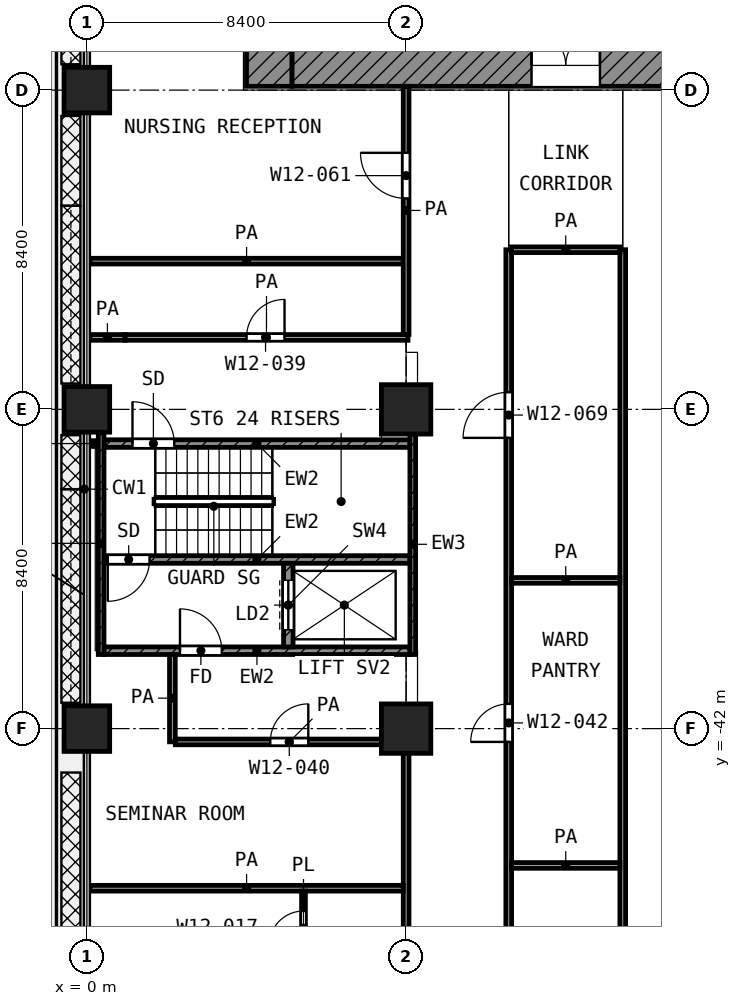
"""IFC4 building model, lengths in metres.
Left out: names, types, materials, properties, quantities, classifications, styles, units other than length and angle.
Written with IfcOpenShell. Run it as: python <this file> out.ifc"""

import sys

from ifc_helpers import new_model, si_unit, direction, frame, frame_2d, origin, origin_2d, place, context, subcontext, project, spatial, rectangle, extrude, element, fill, save


model = new_model("IFC4")
c1 = context("Model", 3, precision=1e-05, world=origin(), true_north=direction((0.0, 1.0)))
c2 = subcontext(c1, "Body", "Model", "MODEL_VIEW")
j1 = project(units=[si_unit("LENGTHUNIT", "METRE"), si_unit("PLANEANGLEUNIT", "RADIAN")], contexts=[c1])
p1 = place(None, origin())
s1 = spatial("IfcSite", under=j1, at=p1, CompositionType="ELEMENT")
p2 = place(p1, origin())
s2 = spatial("IfcBuilding", under=s1, at=p2, CompositionType="ELEMENT")
p3 = place(p2, frame((0.0, 0.0, 77.0)))
s3 = spatial("IfcBuildingStorey", under=s2, at=p3, CompositionType="ELEMENT", Elevation=77.0)
for number, where, z_axis, x_axis in (
    (1, (0.0, -25.2, 0.0), (0.0, 0.0, 1.0), (1.0, 0.0, 0.0)),
    (2, (0.0, -33.6, 0.0), (0.0, 0.0, 1.0), (1.0, 0.0, 0.0)),
):
    element("IfcColumn", number, at=place(p3, frame(where, z_axis=z_axis, x_axis=x_axis)), inside=s3, PredefinedType="COLUMN", context=c2, shape_type="SweptSolid", body=[
        extrude(rectangle(XDim=1.2, YDim=1.2, at=origin_2d()), origin(), (0.0, 0.0, 1.0), 4.2),
    ])
p4 = place(p3, frame((8.4, -33.6, 0.0), z_axis=(0.0, 0.0, 1.0), x_axis=(1.0, 0.0, 0.0)))
e3 = element("IfcColumn", 3, at=p4, inside=s3, PredefinedType="COLUMN", context=c2, shape_type="SweptSolid", body=[
    extrude(rectangle(XDim=1.3, YDim=1.3, at=origin_2d()), origin(), (0.0, 0.0, 1.0), 4.2),
])
p5 = place(p3, frame((0.0, -42.0, 0.0), z_axis=(0.0, 0.0, 1.0), x_axis=(1.0, 0.0, 0.0)))
e4 = element("IfcColumn", 4, at=p5, inside=s3, PredefinedType="COLUMN", context=c2, shape_type="SweptSolid", body=[
    extrude(rectangle(XDim=1.2, YDim=1.2, at=origin_2d()), origin(), (0.0, 0.0, 1.0), 4.2),
])
p6 = place(p3, frame((8.4, -42.0, 0.0), z_axis=(0.0, 0.0, 1.0), x_axis=(1.0, 0.0, 0.0)))
e5 = element("IfcColumn", 5, at=p6, inside=s3, PredefinedType="COLUMN", context=c2, shape_type="SweptSolid", body=[
    extrude(rectangle(XDim=1.3, YDim=1.3, at=origin_2d()), origin(), (0.0, 0.0, 1.0), 4.2),
])
p7 = place(p3, frame((4.8, -25.1, 0.0), z_axis=(0.0, 0.0, 1.0), x_axis=(0.0, 1.0, 0.0)))
e6 = element("IfcWall", 6, at=p7, inside=s3, PredefinedType="SHEAR", context=c2, shape_type="SweptSolid", body=[
    extrude(rectangle(XDim=19.7, YDim=1.2, at=frame_2d((9.85, 0.0))), origin(), (0.0, 0.0, 1.0), 3.9),
])
p8 = place(p7, frame((11.55, 0.0, 0.0)))
e7 = element("IfcOpeningElement", 7, at=p8, cuts=e6, PredefinedType="OPENING", context=c2, shape_type="SweptSolid", body=[
    extrude(rectangle(XDim=1.1, YDim=2.1, at=frame_2d((0.55, 1.05))), frame((0.0, 0.61, 0.0), z_axis=(0.0, -1.0, 0.0), x_axis=(1.0, 0.0, 0.0)), (0.0, 0.0, 1.0), 1.22),
])
p9 = place(p7, frame((2.25, 0.0, 0.0)))
e8 = element("IfcOpeningElement", 8, at=p9, cuts=e6, PredefinedType="OPENING", context=c2, shape_type="SweptSolid", body=[
    extrude(rectangle(XDim=1.1, YDim=2.1, at=frame_2d((0.55, 1.05))), frame((0.0, 0.61, 0.0), z_axis=(0.0, -1.0, 0.0), x_axis=(1.0, 0.0, 0.0)), (0.0, 0.0, 1.0), 1.22),
])
p10 = place(p3, frame((5.4, -24.55, 0.0), z_axis=(0.0, 0.0, 1.0), x_axis=(1.0, 0.0, 0.0)))
e9 = element("IfcWall", 9, at=p10, inside=s3, PredefinedType="SHEAR", context=c2, shape_type="SweptSolid", body=[
    extrude(rectangle(XDim=18.6, YDim=1.1, at=frame_2d((9.3, 0.0))), origin(), (0.0, 0.0, 1.0), 3.9),
])
p11 = place(p10, frame((6.3, 0.0, 0.0)))
e10 = element("IfcOpeningElement", 10, at=p11, cuts=e9, PredefinedType="OPENING", context=c2, shape_type="SweptSolid", body=[
    extrude(rectangle(XDim=1.8, YDim=2.1, at=frame_2d((0.9, 1.05))), frame((0.0, 0.56, 0.0), z_axis=(0.0, -1.0, 0.0), x_axis=(1.0, 0.0, 0.0)), (0.0, 0.0, 1.0), 1.12),
])
p12 = place(p3, frame((0.375, -40.05, 0.0), z_axis=(0.0, 0.0, 1.0), x_axis=(0.0, 1.0, 0.0)))
e11 = element("IfcWall", 11, at=p12, inside=s3, PredefinedType="SHEAR", context=c2, shape_type="SweptSolid", body=[
    extrude(rectangle(XDim=5.85, YDim=0.15, at=frame_2d((2.925, 0.0))), origin(), (0.0, 0.0, 1.0), 3.9),
])
p13 = place(p3, frame((8.575, -40.05, 0.0), z_axis=(0.0, 0.0, 1.0), x_axis=(0.0, 1.0, 0.0)))
e12 = element("IfcWall", 12, at=p13, inside=s3, PredefinedType="SHEAR", context=c2, shape_type="SweptSolid", body=[
    extrude(rectangle(XDim=5.8, YDim=0.15, at=frame_2d((2.9, 0.0))), origin(), (0.0, 0.0, 1.0), 3.9),
])
p14 = place(p3, frame((0.45, -34.5, 0.0), z_axis=(0.0, 0.0, 1.0), x_axis=(1.0, 0.0, 0.0)))
e13 = element("IfcWall", 13, at=p14, inside=s3, PredefinedType="SHEAR", context=c2, shape_type="SweptSolid", body=[
    extrude(rectangle(XDim=8.05, YDim=0.2, at=frame_2d((4.025, 0.0))), origin(), (0.0, 0.0, 1.0), 3.9),
])
p15 = place(p14, frame((0.75, 0.0, 0.0)))
e14 = element("IfcOpeningElement", 14, at=p15, cuts=e13, PredefinedType="OPENING", context=c2, shape_type="SweptSolid", body=[
    extrude(rectangle(XDim=1.1, YDim=2.1, at=frame_2d((0.55, 1.05))), frame((0.0, 0.11, 0.0), z_axis=(0.0, -1.0, 0.0), x_axis=(1.0, 0.0, 0.0)), (0.0, 0.0, 1.0), 0.22),
])
p16 = place(p3, frame((0.45, -37.55, 0.0), z_axis=(0.0, 0.0, 1.0), x_axis=(1.0, 0.0, 0.0)))
e15 = element("IfcWall", 15, at=p16, inside=s3, PredefinedType="SHEAR", context=c2, shape_type="SweptSolid", body=[
    extrude(rectangle(XDim=8.05, YDim=0.2, at=frame_2d((4.025, 0.0))), origin(), (0.0, 0.0, 1.0), 3.9),
])
p17 = place(p16, frame((0.1, 0.0, 0.0)))
e16 = element("IfcOpeningElement", 16, at=p17, cuts=e15, PredefinedType="OPENING", context=c2, shape_type="SweptSolid", body=[
    extrude(rectangle(XDim=1.1, YDim=2.1, at=frame_2d((0.55, 1.05))), frame((0.0, 0.11, 0.0), z_axis=(0.0, -1.0, 0.0), x_axis=(1.0, 0.0, 0.0)), (0.0, 0.0, 1.0), 0.22),
])
p18 = place(p3, frame((0.45, -39.95, 0.0), z_axis=(0.0, 0.0, 1.0), x_axis=(1.0, 0.0, 0.0)))
e17 = element("IfcWall", 17, at=p18, inside=s3, PredefinedType="SHEAR", context=c2, shape_type="SweptSolid", body=[
    extrude(rectangle(XDim=8.05, YDim=0.2, at=frame_2d((4.025, 0.0))), origin(), (0.0, 0.0, 1.0), 3.9),
])
p19 = place(p18, frame((2.0, 0.0, 0.0)))
e18 = element("IfcOpeningElement", 18, at=p19, cuts=e17, PredefinedType="OPENING", context=c2, shape_type="SweptSolid", body=[
    extrude(rectangle(XDim=1.1, YDim=2.1, at=frame_2d((0.55, 1.05))), frame((0.0, 0.11, 0.0), z_axis=(0.0, -1.0, 0.0), x_axis=(1.0, 0.0, 0.0)), (0.0, 0.0, 1.0), 0.22),
])
p20 = place(p3, frame((5.3, -39.85, 0.0), z_axis=(0.0, 0.0, 1.0), x_axis=(0.0, 1.0, 0.0)))
e19 = element("IfcWall", 19, at=p20, inside=s3, PredefinedType="SHEAR", context=c2, shape_type="SweptSolid", body=[
    extrude(rectangle(XDim=2.2, YDim=0.25, at=frame_2d((1.1, 0.0))), origin(), (0.0, 0.0, 1.0), 3.9),
])
p21 = place(p20, frame((0.45, 0.0, 0.0)))
e20 = element("IfcOpeningElement", 20, at=p21, cuts=e19, PredefinedType="OPENING", context=c2, shape_type="SweptSolid", body=[
    extrude(rectangle(XDim=1.3, YDim=2.1, at=frame_2d((0.65, 1.05))), frame((0.0, 0.135, 0.0), z_axis=(0.0, -1.0, 0.0), x_axis=(1.0, 0.0, 0.0)), (0.0, 0.0, 1.0), 0.27),
])
p22 = place(p3, frame((5.7, -48.3, 0.0), z_axis=(0.0, 0.0, 1.0), x_axis=(0.0, 1.0, 0.0)))
e21 = element("IfcWall", 21, at=p22, inside=s3, PredefinedType="PARTITIONING", context=c2, shape_type="SweptSolid", body=[
    extrude(rectangle(XDim=2.025, YDim=0.1, at=frame_2d((1.013, 0.0))), origin(), (0.0, 0.0, 1.0), 3.9),
])
p23 = place(p22, frame((0.6, 0.0, 0.0)))
e22 = element("IfcOpeningElement", 22, at=p23, cuts=e21, PredefinedType="OPENING", context=c2, shape_type="SweptSolid", body=[
    extrude(rectangle(XDim=0.9, YDim=2.1, at=frame_2d((0.45, 1.05))), frame((0.0, 0.06, 0.0), z_axis=(0.0, -1.0, 0.0), x_axis=(1.0, 0.0, 0.0)), (0.0, 0.0, 1.0), 0.12),
])
p24 = place(p3, frame((0.08, -46.2, 0.0), z_axis=(0.0, 0.0, 1.0), x_axis=(1.0, 0.0, 0.0)))
e23 = element("IfcWall", 23, at=p24, inside=s3, PredefinedType="PARTITIONING", context=c2, shape_type="SweptSolid", body=[
    extrude(rectangle(XDim=8.245, YDim=0.15, at=frame_2d((4.123, 0.0))), origin(), (0.0, 0.0, 1.0), 3.9),
])
p25 = place(p3, frame((11.175, -45.6, 0.0), z_axis=(0.0, 0.0, 1.0), x_axis=(1.0, 0.0, 0.0)))
e24 = element("IfcWall", 24, at=p25, inside=s3, PredefinedType="PARTITIONING", context=c2, shape_type="SweptSolid", body=[
    extrude(rectangle(XDim=2.85, YDim=0.15, at=frame_2d((1.425, 0.0))), origin(), (0.0, 0.0, 1.0), 3.9),
])
p26 = place(p3, frame((2.327, -42.35, 0.0), z_axis=(0.0, 0.0, 1.0), x_axis=(1.0, 0.0, 0.0)))
e25 = element("IfcWall", 25, at=p26, inside=s3, PredefinedType="PARTITIONING", context=c2, shape_type="SweptSolid", body=[
    extrude(rectangle(XDim=5.998, YDim=0.15, at=frame_2d((2.999, 0.0))), origin(), (0.0, 0.0, 1.0), 3.9),
])
p27 = place(p26, frame((2.499, 0.0, 0.0)))
e26 = element("IfcOpeningElement", 26, at=p27, cuts=e25, PredefinedType="OPENING", context=c2, shape_type="SweptSolid", body=[
    extrude(rectangle(XDim=1.0, YDim=2.1, at=frame_2d((0.5, 1.05))), frame((0.0, 0.085, 0.0), z_axis=(0.0, -1.0, 0.0), x_axis=(1.0, 0.0, 0.0)), (0.0, 0.0, 1.0), 0.17),
])
p28 = place(p3, frame((11.175, -38.1, 0.0), z_axis=(0.0, 0.0, 1.0), x_axis=(1.0, 0.0, 0.0)))
e27 = element("IfcWall", 27, at=p28, inside=s3, PredefinedType="PARTITIONING", context=c2, shape_type="SweptSolid", body=[
    extrude(rectangle(XDim=2.85, YDim=0.15, at=frame_2d((1.425, 0.0))), origin(), (0.0, 0.0, 1.0), 3.9),
])
p29 = place(p3, frame((0.08, -34.5, 0.0), z_axis=(0.0, 0.0, 1.0), x_axis=(1.0, 0.0, 0.0)))
e28 = element("IfcWall", 28, at=p29, inside=s3, PredefinedType="PARTITIONING", context=c2, shape_type="SweptSolid", body=[
    extrude(rectangle(XDim=0.19, YDim=0.15, at=frame_2d((0.095, 0.0))), origin(), (0.0, 0.0, 1.0), 3.9),
])
p30 = place(p3, frame((0.08, -31.707, 0.0), z_axis=(0.0, 0.0, 1.0), x_axis=(1.0, 0.0, 0.0)))
e29 = element("IfcWall", 29, at=p30, inside=s3, PredefinedType="PARTITIONING", context=c2, shape_type="SweptSolid", body=[
    extrude(rectangle(XDim=0.92, YDim=0.15, at=frame_2d((0.46, 0.0))), origin(), (0.0, 0.0, 1.0), 3.9),
])
p31 = place(p3, frame((1.002, -31.707, 0.0), z_axis=(0.0, 0.0, 1.0), x_axis=(1.0, 0.0, 0.0)))
e30 = element("IfcWall", 30, at=p31, inside=s3, PredefinedType="PARTITIONING", context=c2, shape_type="SweptSolid", body=[
    extrude(rectangle(XDim=7.448, YDim=0.15, at=frame_2d((3.724, 0.0))), origin(), (0.0, 0.0, 1.0), 3.9),
])
p32 = place(p31, frame((3.199, 0.0, 0.0)))
e31 = element("IfcOpeningElement", 31, at=p32, cuts=e30, PredefinedType="OPENING", context=c2, shape_type="SweptSolid", body=[
    extrude(rectangle(XDim=1.0, YDim=2.1, at=frame_2d((0.5, 1.05))), frame((0.0, 0.085, 0.0), z_axis=(0.0, -1.0, 0.0), x_axis=(1.0, 0.0, 0.0)), (0.0, 0.0, 1.0), 0.17),
])
p33 = place(p3, frame((0.08, -29.7, 0.0), z_axis=(0.0, 0.0, 1.0), x_axis=(1.0, 0.0, 0.0)))
e32 = element("IfcWall", 32, at=p33, inside=s3, PredefinedType="PARTITIONING", context=c2, shape_type="SweptSolid", body=[
    extrude(rectangle(XDim=8.245, YDim=0.15, at=frame_2d((4.123, 0.0))), origin(), (0.0, 0.0, 1.0), 3.9),
])
p34 = place(p3, frame((11.175, -29.4, 0.0), z_axis=(0.0, 0.0, 1.0), x_axis=(1.0, 0.0, 0.0)))
e33 = element("IfcWall", 33, at=p34, inside=s3, PredefinedType="PARTITIONING", context=c2, shape_type="SweptSolid", body=[
    extrude(rectangle(XDim=2.85, YDim=0.15, at=frame_2d((1.425, 0.0))), origin(), (0.0, 0.0, 1.0), 3.9),
])
p35 = place(p3, frame((2.25, -42.348, 0.0), z_axis=(0.0, 0.0, 1.0), x_axis=(0.0, 1.0, 0.0)))
e34 = element("IfcWall", 34, at=p35, inside=s3, PredefinedType="PARTITIONING", context=c2, shape_type="SweptSolid", body=[
    extrude(rectangle(XDim=2.298, YDim=0.15, at=frame_2d((1.149, 0.0))), origin(), (0.0, 0.0, 1.0), 3.9),
])
p36 = place(p3, frame((8.4, -58.798, 0.0), z_axis=(0.0, 0.0, 1.0), x_axis=(0.0, 1.0, 0.0)))
e35 = element("IfcWall", 35, at=p36, inside=s3, PredefinedType="PARTITIONING", context=c2, shape_type="SweptSolid", body=[
    extrude(rectangle(XDim=16.448, YDim=0.15, at=frame_2d((8.224, 0.0))), origin(), (0.0, 0.0, 1.0), 3.9),
])
p37 = place(p36, frame((9.098, 0.0, 0.0)))
e36 = element("IfcOpeningElement", 36, at=p37, cuts=e35, PredefinedType="OPENING", context=c2, shape_type="SweptSolid", body=[
    extrude(rectangle(XDim=1.2, YDim=2.1, at=frame_2d((0.6, 1.05))), frame((0.0, 0.085, 0.0), z_axis=(0.0, -1.0, 0.0), x_axis=(1.0, 0.0, 0.0)), (0.0, 0.0, 1.0), 0.17),
])
p38 = place(p36, frame((0.699, 0.0, 0.0)))
e37 = element("IfcOpeningElement", 37, at=p38, cuts=e35, PredefinedType="OPENING", context=c2, shape_type="SweptSolid", body=[
    extrude(rectangle(XDim=1.2, YDim=2.1, at=frame_2d((0.6, 1.05))), frame((0.0, 0.085, 0.0), z_axis=(0.0, -1.0, 0.0), x_axis=(1.0, 0.0, 0.0)), (0.0, 0.0, 1.0), 0.17),
])
p39 = place(p36, frame((6.498, 0.0, 0.0)))
e38 = element("IfcOpeningElement", 38, at=p39, cuts=e35, PredefinedType="OPENING", context=c2, shape_type="SweptSolid", body=[
    extrude(rectangle(XDim=1.2, YDim=2.1, at=frame_2d((0.6, 1.05))), frame((0.0, 0.085, 0.0), z_axis=(0.0, -1.0, 0.0), x_axis=(1.0, 0.0, 0.0)), (0.0, 0.0, 1.0), 0.17),
])
p40 = place(p3, frame((8.4, -31.632, 0.0), z_axis=(0.0, 0.0, 1.0), x_axis=(0.0, 1.0, 0.0)))
e39 = element("IfcWall", 39, at=p40, inside=s3, PredefinedType="PARTITIONING", context=c2, shape_type="SweptSolid", body=[
    extrude(rectangle(XDim=6.532, YDim=0.15, at=frame_2d((3.266, 0.0))), origin(), (0.0, 0.0, 1.0), 3.9),
])
p41 = place(p40, frame((3.582, 0.0, 0.0)))
e40 = element("IfcOpeningElement", 40, at=p41, cuts=e39, PredefinedType="OPENING", context=c2, shape_type="SweptSolid", body=[
    extrude(rectangle(XDim=1.2, YDim=2.1, at=frame_2d((0.6, 1.05))), frame((0.0, 0.085, 0.0), z_axis=(0.0, -1.0, 0.0), x_axis=(1.0, 0.0, 0.0)), (0.0, 0.0, 1.0), 0.17),
])
p42 = place(p3, frame((11.1, -68.7, 0.0), z_axis=(0.0, 0.0, 1.0), x_axis=(0.0, 1.0, 0.0)))
e41 = element("IfcWall", 41, at=p42, inside=s3, PredefinedType="PARTITIONING", context=c2, shape_type="SweptSolid", body=[
    extrude(rectangle(XDim=39.3, YDim=0.15, at=frame_2d((19.65, 0.0))), origin(), (0.0, 0.0, 1.0), 3.9),
])
p43 = place(p42, frame((34.35, 0.0, 0.0)))
e42 = element("IfcOpeningElement", 42, at=p43, cuts=e41, PredefinedType="OPENING", context=c2, shape_type="SweptSolid", body=[
    extrude(rectangle(XDim=1.2, YDim=2.1, at=frame_2d((0.6, 1.05))), frame((0.0, 0.085, 0.0), z_axis=(0.0, -1.0, 0.0), x_axis=(1.0, 0.0, 0.0)), (0.0, 0.0, 1.0), 0.17),
])
p44 = place(p42, frame((26.35, 0.0, 0.0)))
e43 = element("IfcOpeningElement", 43, at=p44, cuts=e41, PredefinedType="OPENING", context=c2, shape_type="SweptSolid", body=[
    extrude(rectangle(XDim=1.0, YDim=2.1, at=frame_2d((0.5, 1.05))), frame((0.0, 0.085, 0.0), z_axis=(0.0, -1.0, 0.0), x_axis=(1.0, 0.0, 0.0)), (0.0, 0.0, 1.0), 0.17),
])
p45 = place(p42, frame((6.55, 0.0, 0.0)))
e44 = element("IfcOpeningElement", 44, at=p45, cuts=e41, PredefinedType="OPENING", context=c2, shape_type="SweptSolid", body=[
    extrude(rectangle(XDim=1.0, YDim=2.1, at=frame_2d((0.5, 1.05))), frame((0.0, 0.085, 0.0), z_axis=(0.0, -1.0, 0.0), x_axis=(1.0, 0.0, 0.0)), (0.0, 0.0, 1.0), 0.17),
])
p46 = place(p3, frame((14.1, -68.7, 0.0), z_axis=(0.0, 0.0, 1.0), x_axis=(0.0, 1.0, 0.0)))
e45 = element("IfcWall", 45, at=p46, inside=s3, PredefinedType="PARTITIONING", context=c2, shape_type="SweptSolid", body=[
    extrude(rectangle(XDim=39.3, YDim=0.15, at=frame_2d((19.65, 0.0))), origin(), (0.0, 0.0, 1.0), 3.9),
])
p47 = place(p46, frame((18.1, 0.0, 0.0)))
e46 = element("IfcOpeningElement", 46, at=p47, cuts=e45, PredefinedType="OPENING", context=c2, shape_type="SweptSolid", body=[
    extrude(rectangle(XDim=1.0, YDim=2.1, at=frame_2d((0.5, 1.05))), frame((0.0, 0.085, 0.0), z_axis=(0.0, -1.0, 0.0), x_axis=(1.0, 0.0, 0.0)), (0.0, 0.0, 1.0), 0.17),
])
p48 = place(p11, origin())
e47 = element("IfcDoor", 47, at=p48, inside=s3, OperationType="DOUBLE_DOOR_SINGLE_SWING", PredefinedType="DOOR", context=c2, shape_type="SweptSolid", body=[
    extrude(rectangle(XDim=1.8, YDim=2.1, at=frame_2d((0.9, 1.05))), frame((0.0, 0.025, 0.0), z_axis=(0.0, -1.0, 0.0), x_axis=(1.0, 0.0, 0.0)), (0.0, 0.0, 1.0), 0.05),
])
fill(e10, e47)
p49 = place(p15, origin())
e48 = element("IfcDoor", 48, at=p49, inside=s3, OperationType="SINGLE_SWING_LEFT", PredefinedType="DOOR", context=c2, shape_type="SweptSolid", body=[
    extrude(rectangle(XDim=1.1, YDim=2.1, at=frame_2d((0.55, 1.05))), frame((0.0, 0.025, 0.0), z_axis=(0.0, -1.0, 0.0), x_axis=(1.0, 0.0, 0.0)), (0.0, 0.0, 1.0), 0.05),
])
fill(e14, e48)
p50 = place(p17, frame((1.1, 0.0, 0.0), z_axis=(0.0, 0.0, 1.0), x_axis=(-1.0, 0.0, 0.0)))
e49 = element("IfcDoor", 49, at=p50, inside=s3, OperationType="SINGLE_SWING_LEFT", PredefinedType="DOOR", context=c2, shape_type="SweptSolid", body=[
    extrude(rectangle(XDim=1.1, YDim=2.1, at=frame_2d((0.55, 1.05))), frame((0.0, 0.025, 0.0), z_axis=(0.0, -1.0, 0.0), x_axis=(1.0, 0.0, 0.0)), (0.0, 0.0, 1.0), 0.05),
])
fill(e16, e49)
p51 = place(p21, origin())
e50 = element("IfcDoor", 50, at=p51, inside=s3, OperationType="DOUBLE_DOOR_SLIDING", PredefinedType="DOOR", context=c2, shape_type="SweptSolid", body=[
    extrude(rectangle(XDim=1.3, YDim=2.1, at=frame_2d((0.65, 1.05))), frame((0.0, 0.025, 0.0), z_axis=(0.0, -1.0, 0.0), x_axis=(1.0, 0.0, 0.0)), (0.0, 0.0, 1.0), 0.05),
])
fill(e20, e50)
p52 = place(p19, origin())
e51 = element("IfcDoor", 51, at=p52, inside=s3, OperationType="SINGLE_SWING_LEFT", PredefinedType="DOOR", context=c2, shape_type="SweptSolid", body=[
    extrude(rectangle(XDim=1.1, YDim=2.1, at=frame_2d((0.55, 1.05))), frame((0.0, 0.025, 0.0), z_axis=(0.0, -1.0, 0.0), x_axis=(1.0, 0.0, 0.0)), (0.0, 0.0, 1.0), 0.05),
])
fill(e18, e51)
p53 = place(p41, origin())
e52 = element("IfcDoor", 52, at=p53, inside=s3, OperationType="SINGLE_SWING_RIGHT", PredefinedType="DOOR", context=c2, shape_type="SweptSolid", body=[
    extrude(rectangle(XDim=1.2, YDim=2.1, at=frame_2d((0.6, 1.05))), frame((0.0, 0.025, 0.0), z_axis=(0.0, -1.0, 0.0), x_axis=(1.0, 0.0, 0.0)), (0.0, 0.0, 1.0), 0.05),
])
fill(e40, e52)
p54 = place(p32, origin())
e53 = element("IfcDoor", 53, at=p54, inside=s3, OperationType="SINGLE_SWING_RIGHT", PredefinedType="DOOR", context=c2, shape_type="SweptSolid", body=[
    extrude(rectangle(XDim=1.0, YDim=2.1, at=frame_2d((0.5, 1.05))), frame((0.0, 0.025, 0.0), z_axis=(0.0, -1.0, 0.0), x_axis=(1.0, 0.0, 0.0)), (0.0, 0.0, 1.0), 0.05),
])
fill(e31, e53)
p55 = place(p27, origin())
e54 = element("IfcDoor", 54, at=p55, inside=s3, OperationType="SINGLE_SWING_RIGHT", PredefinedType="DOOR", context=c2, shape_type="SweptSolid", body=[
    extrude(rectangle(XDim=1.0, YDim=2.1, at=frame_2d((0.5, 1.05))), frame((0.0, 0.025, 0.0), z_axis=(0.0, -1.0, 0.0), x_axis=(1.0, 0.0, 0.0)), (0.0, 0.0, 1.0), 0.05),
])
fill(e26, e54)
p56 = place(p23, origin())
e55 = element("IfcDoor", 55, at=p56, inside=s3, OperationType="SINGLE_SWING_LEFT", PredefinedType="DOOR", context=c2, shape_type="SweptSolid", body=[
    extrude(rectangle(XDim=0.9, YDim=2.1, at=frame_2d((0.45, 1.05))), frame((0.0, 0.025, 0.0), z_axis=(0.0, -1.0, 0.0), x_axis=(1.0, 0.0, 0.0)), (0.0, 0.0, 1.0), 0.05),
])
fill(e22, e55)
p57 = place(p43, origin())
e56 = element("IfcDoor", 56, at=p57, inside=s3, OperationType="SINGLE_SWING_LEFT", PredefinedType="DOOR", context=c2, shape_type="SweptSolid", body=[
    extrude(rectangle(XDim=1.2, YDim=2.1, at=frame_2d((0.6, 1.05))), frame((0.0, 0.025, 0.0), z_axis=(0.0, -1.0, 0.0), x_axis=(1.0, 0.0, 0.0)), (0.0, 0.0, 1.0), 0.05),
])
fill(e42, e56)
p58 = place(p44, origin())
e57 = element("IfcDoor", 57, at=p58, inside=s3, OperationType="SINGLE_SWING_LEFT", PredefinedType="DOOR", context=c2, shape_type="SweptSolid", body=[
    extrude(rectangle(XDim=1.0, YDim=2.1, at=frame_2d((0.5, 1.05))), frame((0.0, 0.025, 0.0), z_axis=(0.0, -1.0, 0.0), x_axis=(1.0, 0.0, 0.0)), (0.0, 0.0, 1.0), 0.05),
])
fill(e43, e57)
save(model, sys.argv[1])
